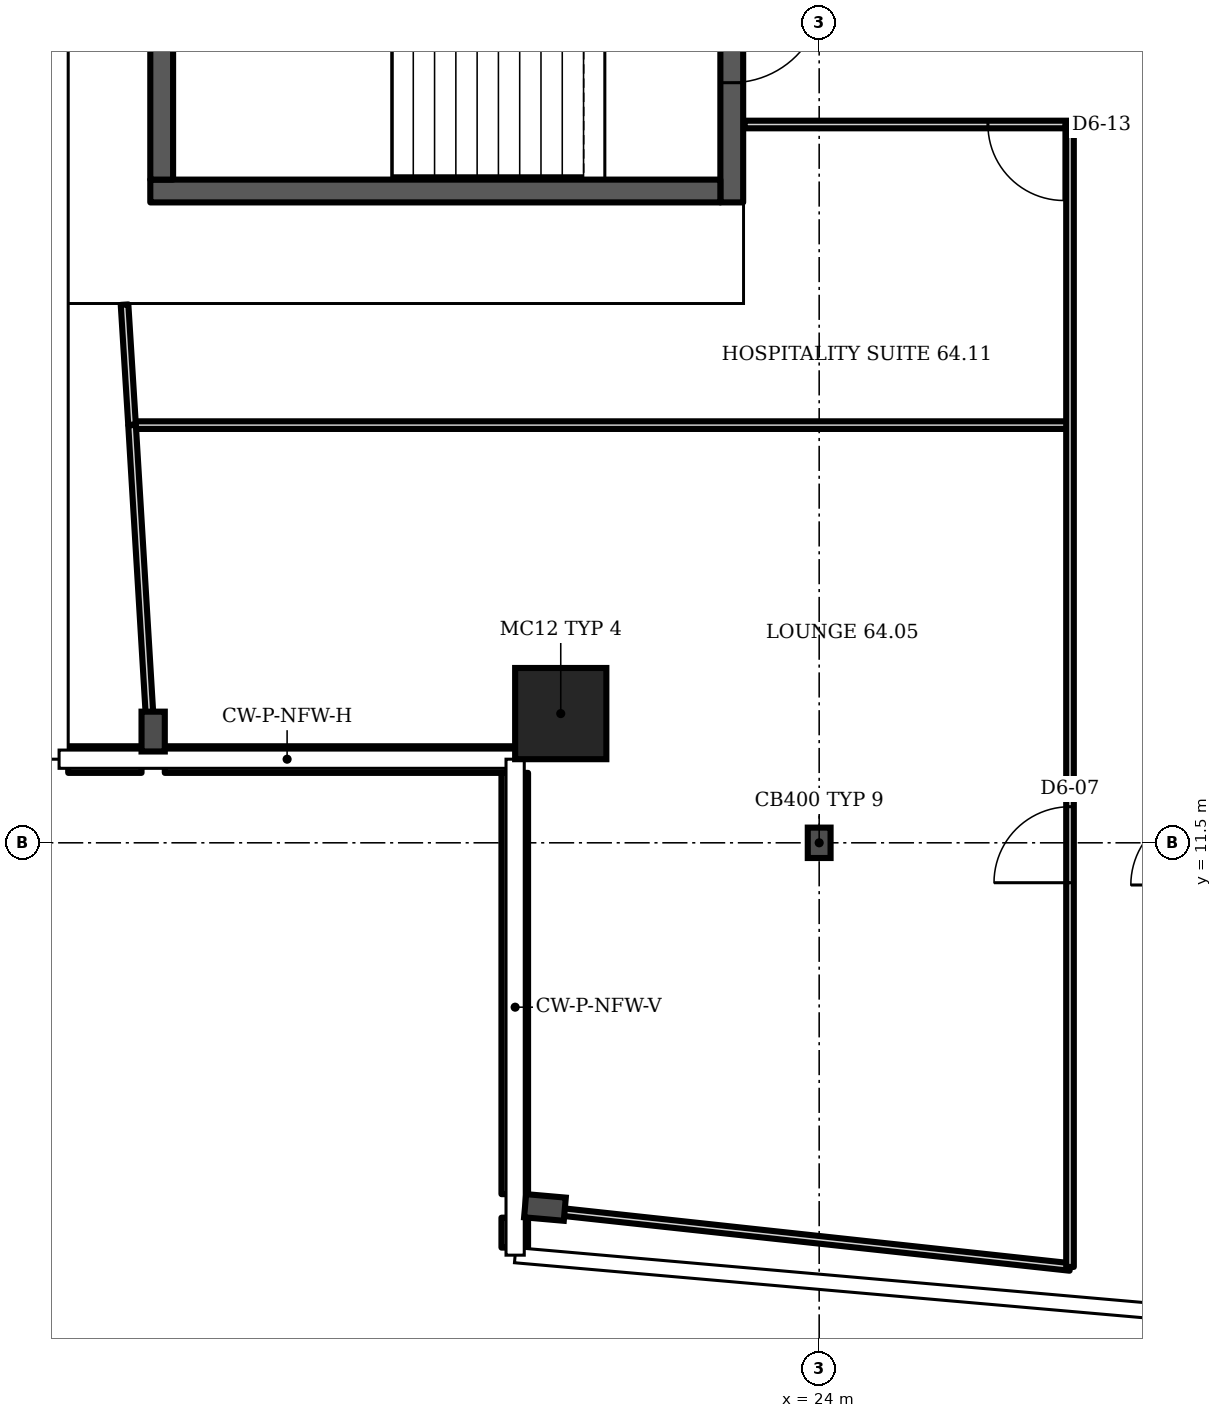
"""IFC4 building model, lengths in metres.
Left out: names, types, materials, properties, quantities, classifications, styles, units other than length and angle.
Written with IfcOpenShell. Run it as: python <this file> out.ifc"""

import sys

from ifc_helpers import new_model, si_unit, direction, frame, frame_2d, origin, origin_2d, place, context, subcontext, project, spatial, rectangle, i_section, extrude, element, fill, save


model = new_model("IFC4")
c1 = context("Model", 3, precision=1e-05, world=origin(), true_north=direction((0.0, 1.0)))
c2 = subcontext(c1, "Body", "Model", "MODEL_VIEW")
j1 = project(units=[si_unit("LENGTHUNIT", "METRE"), si_unit("PLANEANGLEUNIT", "RADIAN")], contexts=[c1])
p1 = place(None, origin())
s1 = spatial("IfcSite", under=j1, at=p1, CompositionType="ELEMENT")
p2 = place(p1, origin())
s2 = spatial("IfcBuilding", under=s1, at=p2, CompositionType="ELEMENT")
p3 = place(p2, frame((0.0, 0.0, 253.9)))
s3 = spatial("IfcBuildingStorey", under=s2, at=p3, CompositionType="ELEMENT", Elevation=253.9)
p4 = place(p3, frame((20.6, 13.2, 0.0), z_axis=(0.0, 0.0, 1.0), x_axis=(1.0, 0.0, 0.0)))
e1 = element("IfcColumn", 1, at=p4, inside=s3, PredefinedType="COLUMN", context=c2, shape_type="SweptSolid", body=[
    extrude(rectangle(XDim=1.2, YDim=1.2, at=origin_2d()), origin(), (0.0, 0.0, 1.0), 3.6),
])
for number, where, z_axis, x_axis in (
    (2, (20.392, 6.703, 0.0), (0.0, 0.0, 1.0), (-0.087, -0.996, 0.0)),
    (3, (15.238, 12.963, 0.0), (0.0, 0.0, 1.0), (-1.0, 0.0, 0.0)),
):
    element("IfcColumn", number, at=place(p3, frame(where, z_axis=z_axis, x_axis=x_axis)), inside=s3, PredefinedType="COLUMN", context=c2, shape_type="SweptSolid", body=[
        extrude(i_section(OverallWidth=0.306, OverallDepth=0.524, WebThickness=0.021, FlangeThickness=0.04, FilletRadius=0.027, at=origin_2d()), origin(), (0.0, 0.0, 1.0), 3.6),
    ])
p5 = place(p3, frame((24.0, 11.5, 0.0), z_axis=(0.0, 0.0, 1.0), x_axis=(1.0, 0.0, 0.0)))
e4 = element("IfcColumn", 4, at=p5, inside=s3, PredefinedType="COLUMN", context=c2, shape_type="SweptSolid", body=[
    extrude(i_section(OverallWidth=0.3, OverallDepth=0.4, WebThickness=0.013, FlangeThickness=0.024, FilletRadius=0.027, at=origin_2d()), origin(), (0.0, 0.0, 1.0), 3.6),
])
p6 = place(p3, frame((14.12, 12.595, 0.0), z_axis=(0.0, 0.0, 1.0), x_axis=(1.0, 0.0, 0.0)))
e5 = element("IfcWall", 5, at=p6, inside=s3, PredefinedType="SOLIDWALL", context=c2, shape_type="SweptSolid", body=[
    extrude(rectangle(XDim=0.965, YDim=0.35, at=frame_2d((0.482, 0.0))), origin(), (0.0, 0.0, 1.0), 1.0),
])
p7 = place(p3, frame((15.391, 12.595, 0.0), z_axis=(0.0, 0.0, 1.0), x_axis=(1.0, 0.0, 0.0)))
e6 = element("IfcWall", 6, at=p7, inside=s3, PredefinedType="SOLIDWALL", context=c2, shape_type="SweptSolid", body=[
    extrude(rectangle(XDim=4.609, YDim=0.35, at=frame_2d((2.305, 0.0))), origin(), (0.0, 0.0, 1.0), 1.0),
])
p8 = place(p3, frame((19.995, 12.42, 0.0), z_axis=(0.0, 0.0, 1.0), x_axis=(0.0, -1.0, 0.0)))
e7 = element("IfcWall", 7, at=p8, inside=s3, PredefinedType="SOLIDWALL", context=c2, shape_type="SweptSolid", body=[
    extrude(rectangle(XDim=5.542, YDim=0.35, at=frame_2d((2.771, 0.0))), origin(), (0.0, 0.0, 1.0), 1.0),
])
p9 = place(p3, frame((19.995, 6.568, 0.0), z_axis=(0.0, 0.0, 1.0), x_axis=(0.0, -1.0, 0.0)))
e8 = element("IfcWall", 8, at=p9, inside=s3, PredefinedType="SOLIDWALL", context=c2, shape_type="SweptSolid", body=[
    extrude(rectangle(XDim=0.394, YDim=0.35, at=frame_2d((0.197, 0.0))), origin(), (0.0, 0.0, 1.0), 1.0),
])
p10 = place(p3, frame((22.85, 19.925, 0.0), z_axis=(0.0, 0.0, 1.0), x_axis=(0.0, 1.0, 0.0)))
e9 = element("IfcWall", 9, at=p10, inside=s3, PredefinedType="SHEAR", context=c2, shape_type="SweptSolid", body=[
    extrude(rectangle(XDim=4.35, YDim=0.3, at=frame_2d((2.175, 0.0))), origin(), (0.0, 0.0, 1.0), 3.2),
])
p11 = place(p10, frame((1.575, 0.0, 0.0)))
e10 = element("IfcOpeningElement", 10, at=p11, cuts=e9, PredefinedType="OPENING", context=c2, shape_type="SweptSolid", body=[
    extrude(rectangle(XDim=1.2, YDim=2.1, at=frame_2d((0.6, 1.05))), frame((0.0, 0.16, 0.0), z_axis=(0.0, -1.0, 0.0), x_axis=(1.0, 0.0, 0.0)), (0.0, 0.0, 1.0), 0.32),
])
p12 = place(p3, frame((14.96, 16.995, 0.0), z_axis=(0.0, 0.0, 1.0), x_axis=(1.0, 0.0, 0.0)))
e11 = element("IfcWall", 11, at=p12, inside=s3, PredefinedType="PARTITIONING", context=c2, shape_type="SweptSolid", body=[
    extrude(rectangle(XDim=12.34, YDim=0.1, at=frame_2d((6.17, 0.0))), origin(), (0.0, 0.0, 1.0), 3.2),
])
p13 = place(p3, frame((14.96, 17.0, 0.0), z_axis=(0.0, 0.0, 1.0), x_axis=(-0.062301, 0.998053, 0.0)))
e12 = element("IfcWall", 12, at=p13, inside=s3, PredefinedType="PARTITIONING", context=c2, shape_type="SweptSolid", body=[
    extrude(rectangle(XDim=1.583, YDim=0.1, at=frame_2d((0.792, 0.0))), origin(), (0.0, 0.0, 1.0), 2.58),
])
p14 = place(p3, frame((15.224, 12.62, 0.0), z_axis=(0.0, 0.0, 1.0), x_axis=(-0.060214, 0.998182, 0.0)))
e13 = element("IfcWall", 13, at=p14, inside=s3, PredefinedType="PARTITIONING", context=c2, shape_type="SweptSolid", body=[
    extrude(rectangle(XDim=4.383, YDim=0.1, at=frame_2d((2.191, 0.0))), origin(), (0.0, 0.0, 1.0), 2.58),
])
p15 = place(p3, frame((23.02, 20.95, 0.0), z_axis=(0.0, 0.0, 1.0), x_axis=(1.0, 0.0, 0.0)))
e14 = element("IfcWall", 14, at=p15, inside=s3, PredefinedType="PARTITIONING", context=c2, shape_type="SweptSolid", body=[
    extrude(rectangle(XDim=4.28, YDim=0.1, at=frame_2d((2.14, 0.0))), origin(), (0.0, 0.0, 1.0), 3.2),
])
p16 = place(p15, frame((3.2, 0.0, 0.0)))
e15 = element("IfcOpeningElement", 15, at=p16, cuts=e14, PredefinedType="OPENING", context=c2, shape_type="SweptSolid", body=[
    extrude(rectangle(XDim=1.0, YDim=2.1, at=frame_2d((0.5, 1.05))), frame((0.0, 0.06, 0.0), z_axis=(0.0, -1.0, 0.0), x_axis=(1.0, 0.0, 0.0)), (0.0, 0.0, 1.0), 0.12),
])
p17 = place(p3, frame((27.3, 5.92, 0.0), z_axis=(0.0, 0.0, 1.0), x_axis=(-0.994192, 0.107591, 0.0)))
e16 = element("IfcWall", 16, at=p17, inside=s3, PredefinedType="PARTITIONING", context=c2, shape_type="SweptSolid", body=[
    extrude(rectangle(XDim=7.323, YDim=0.1, at=frame_2d((3.661, 0.0))), origin(), (0.0, 0.0, 1.0), 2.58),
])
p18 = place(p3, frame((27.3, 5.92, 0.0), z_axis=(0.0, 0.0, 1.0), x_axis=(0.0, 1.0, 0.0)))
e17 = element("IfcWall", 17, at=p18, inside=s3, PredefinedType="PARTITIONING", context=c2, shape_type="SweptSolid", body=[
    extrude(rectangle(XDim=15.03, YDim=0.1, at=frame_2d((7.515, 0.0))), origin(), (0.0, 0.0, 1.0), 3.2),
])
p19 = place(p18, frame((5.055, 0.0, 0.0)))
e18 = element("IfcOpeningElement", 18, at=p19, cuts=e17, PredefinedType="OPENING", context=c2, shape_type="SweptSolid", body=[
    extrude(rectangle(XDim=1.0, YDim=2.1, at=frame_2d((0.5, 1.05))), frame((0.0, 0.06, 0.0), z_axis=(0.0, -1.0, 0.0), x_axis=(1.0, 0.0, 0.0)), (0.0, 0.0, 1.0), 0.12),
])
p20 = place(p3, frame((15.2, 20.075, 0.0), z_axis=(0.0, 0.0, 1.0), x_axis=(1.0, 0.0, 0.0)))
e19 = element("IfcWall", 19, at=p20, inside=s3, PredefinedType="SHEAR", context=c2, shape_type="SweptSolid", body=[
    extrude(rectangle(XDim=7.5, YDim=0.3, at=frame_2d((3.75, 0.0))), origin(), (0.0, 0.0, 1.0), 3.2),
])
p21 = place(p3, frame((15.35, 20.225, 0.0), z_axis=(0.0, 0.0, 1.0), x_axis=(0.0, 1.0, 0.0)))
e20 = element("IfcWall", 20, at=p21, inside=s3, PredefinedType="SHEAR", context=c2, shape_type="SweptSolid", body=[
    extrude(rectangle(XDim=3.75, YDim=0.3, at=frame_2d((1.875, 0.0))), origin(), (0.0, 0.0, 1.0), 3.2),
])
p22 = place(p11, origin())
e21 = element("IfcDoor", 21, at=p22, inside=s3, OperationType="SINGLE_SWING_RIGHT", PredefinedType="DOOR", context=c2, shape_type="SweptSolid", body=[
    extrude(rectangle(XDim=1.2, YDim=2.1, at=frame_2d((0.6, 1.05))), frame((0.0, 0.025, 0.0), z_axis=(0.0, -1.0, 0.0), x_axis=(1.0, 0.0, 0.0)), (0.0, 0.0, 1.0), 0.05),
])
fill(e10, e21)
p23 = place(p19, origin())
e22 = element("IfcDoor", 22, at=p23, inside=s3, OperationType="SINGLE_SWING_LEFT", PredefinedType="DOOR", context=c2, shape_type="SweptSolid", body=[
    extrude(rectangle(XDim=1.0, YDim=2.1, at=frame_2d((0.5, 1.05))), frame((0.0, 0.025, 0.0), z_axis=(0.0, -1.0, 0.0), x_axis=(1.0, 0.0, 0.0)), (0.0, 0.0, 1.0), 0.05),
])
fill(e18, e22)
p24 = place(p16, origin())
e23 = element("IfcDoor", 23, at=p24, inside=s3, OperationType="SINGLE_SWING_RIGHT", PredefinedType="DOOR", context=c2, shape_type="SweptSolid", body=[
    extrude(rectangle(XDim=1.0, YDim=2.1, at=frame_2d((0.5, 1.05))), frame((0.0, 0.025, 0.0), z_axis=(0.0, -1.0, 0.0), x_axis=(1.0, 0.0, 0.0)), (0.0, 0.0, 1.0), 0.05),
])
fill(e15, e23)
save(model, sys.argv[1])
